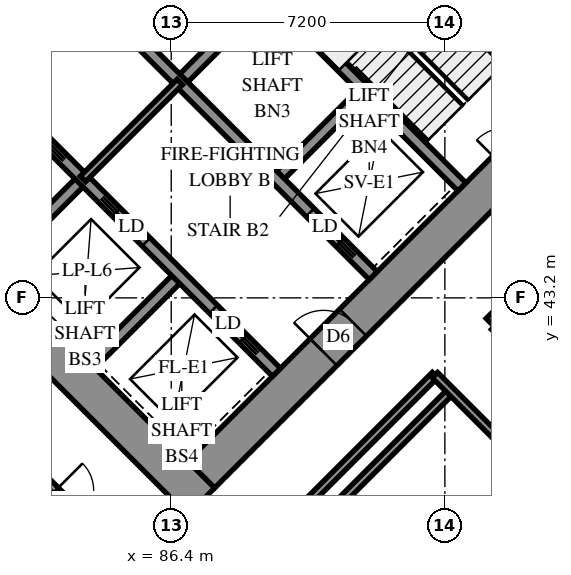
"""IFC4 building model, lengths in metres.
Left out: names, types, materials, properties, quantities, classifications, styles, units other than length and angle.
Written with IfcOpenShell. Run it as: python <this file> out.ifc"""

import sys

from ifc_helpers import new_model, si_unit, direction, frame, frame_2d, origin, place, context, subcontext, project, spatial, polyline, rectangle, outline, extrude, element, fill, save


model = new_model("IFC4")
c1 = context("Model", 3, precision=1e-05, world=origin(), true_north=direction((0.0, 1.0)))
c2 = subcontext(c1, "Body", "Model", "MODEL_VIEW")
j1 = project(units=[si_unit("LENGTHUNIT", "METRE"), si_unit("PLANEANGLEUNIT", "RADIAN")], contexts=[c1])
p1 = place(None, origin())
s1 = spatial("IfcSite", under=j1, at=p1, CompositionType="ELEMENT")
p2 = place(p1, origin())
s2 = spatial("IfcBuilding", under=s1, at=p2, CompositionType="ELEMENT")
p3 = place(p2, frame((0.0, 0.0, 22.8)))
s3 = spatial("IfcBuildingStorey", under=s2, at=p3, CompositionType="ELEMENT", Elevation=22.8)
p4 = place(p3, frame((75.594, 49.443, -0.4), z_axis=(0.0, 0.0, 1.0), x_axis=(0.7071037324, -0.70710983, 0.0)))
e1 = element("IfcWall", 1, at=p4, inside=s3, PredefinedType="SHEAR", context=c2, shape_type="SweptSolid", body=[
    extrude(rectangle(XDim=16.4, YDim=1.0, at=frame_2d((8.2, 0.0))), origin(), (0.0, 0.0, 1.0), 3.6),
])
p5 = place(p3, frame((86.483, 60.333, -0.4), z_axis=(0.0, 0.0, 1.0), x_axis=(0.70710983, -0.7071037324, 0.0)))
e2 = element("IfcWall", 2, at=p5, inside=s3, PredefinedType="SHEAR", context=c2, shape_type="SweptSolid", body=[
    extrude(rectangle(XDim=16.4, YDim=1.0, at=frame_2d((8.2, 0.0))), origin(), (0.0, 0.0, 1.0), 3.6),
])
p6 = place(p5, frame((11.0, 0.0, 0.4)))
e3 = element("IfcOpeningElement", 3, at=p6, cuts=e2, PredefinedType="OPENING", context=c2, shape_type="SweptSolid", body=[
    extrude(rectangle(XDim=0.8, YDim=2.1, at=frame_2d((0.4, 1.05))), frame((0.0, 0.51, 0.0), z_axis=(0.0, -1.0, 0.0), x_axis=(1.0, 0.0, 0.0)), (0.0, 0.0, 1.0), 1.02),
])
p7 = place(p3, frame((76.301, 49.443, -0.4), z_axis=(0.0, 0.0, 1.0), x_axis=(0.7071067812, 0.7071067812, 0.0)))
e4 = element("IfcWall", 4, at=p7, inside=s3, PredefinedType="SHEAR", context=c2, shape_type="SweptSolid", body=[
    extrude(rectangle(XDim=14.4, YDim=1.0, at=frame_2d((7.2, 0.0))), origin(), (0.0, 0.0, 1.0), 3.6),
])
p8 = place(p7, frame((4.55, 0.0, 0.4)))
e5 = element("IfcOpeningElement", 5, at=p8, cuts=e4, PredefinedType="OPENING", context=c2, shape_type="SweptSolid", body=[
    extrude(rectangle(XDim=1.1, YDim=2.1, at=frame_2d((0.55, 1.05))), frame((0.0, 0.51, 0.0), z_axis=(0.0, -1.0, 0.0), x_axis=(1.0, 0.0, 0.0)), (0.0, 0.0, 1.0), 1.02),
])
p9 = place(p7, frame((11.35, 0.0, 0.4)))
e6 = element("IfcOpeningElement", 6, at=p9, cuts=e4, PredefinedType="OPENING", context=c2, shape_type="SweptSolid", body=[
    extrude(rectangle(XDim=1.1, YDim=2.1, at=frame_2d((0.55, 1.05))), frame((0.0, 0.51, 0.0), z_axis=(0.0, -1.0, 0.0), x_axis=(1.0, 0.0, 0.0)), (0.0, 0.0, 1.0), 1.02),
])
p10 = place(p3, frame((87.19, 38.554, -0.4), z_axis=(0.0, 0.0, 1.0), x_axis=(0.707103309, 0.7071102534, 0.0)))
e7 = element("IfcWall", 7, at=p10, inside=s3, PredefinedType="SHEAR", context=c2, shape_type="SweptSolid", body=[
    extrude(rectangle(XDim=14.4, YDim=1.0, at=frame_2d((7.2, 0.0))), origin(), (0.0, 0.0, 1.0), 3.6),
])
p11 = place(p10, frame((4.55, 0.0, 0.4)))
e8 = element("IfcOpeningElement", 8, at=p11, cuts=e7, PredefinedType="OPENING", context=c2, shape_type="SweptSolid", body=[
    extrude(rectangle(XDim=1.1, YDim=2.1, at=frame_2d((0.55, 1.05))), frame((0.0, 0.51, 0.0), z_axis=(0.0, -1.0, 0.0), x_axis=(1.0, 0.0, 0.0)), (0.0, 0.0, 1.0), 1.02),
])
p12 = place(p10, frame((11.35, 0.0, 0.4)))
e9 = element("IfcOpeningElement", 9, at=p12, cuts=e7, PredefinedType="OPENING", context=c2, shape_type="SweptSolid", body=[
    extrude(rectangle(XDim=1.1, YDim=2.1, at=frame_2d((0.55, 1.05))), frame((0.0, 0.51, 0.0), z_axis=(0.0, -1.0, 0.0), x_axis=(1.0, 0.0, 0.0)), (0.0, 0.0, 1.0), 1.02),
])
p13 = place(p3, frame((81.746, 43.999, 0.0), z_axis=(0.0, 0.0, 1.0), x_axis=(0.7071067812, 0.7071067812, 0.0)))
e10 = element("IfcWall", 10, at=p13, inside=s3, PredefinedType="SOLIDWALL", context=c2, shape_type="SweptSolid", body=[
    extrude(rectangle(XDim=3.3, YDim=0.3, at=frame_2d((1.65, 0.0))), origin(), (0.0, 0.0, 1.0), 3.9),
])
p14 = place(p3, frame((86.625, 48.878, 0.0), z_axis=(0.0, 0.0, 1.0), x_axis=(0.7071067812, 0.7071067812, 0.0)))
e11 = element("IfcWall", 11, at=p14, inside=s3, PredefinedType="SOLIDWALL", context=c2, shape_type="SweptSolid", body=[
    extrude(rectangle(XDim=3.3, YDim=0.3, at=frame_2d((1.65, 0.0))), origin(), (0.0, 0.0, 1.0), 3.9),
])
p15 = place(p3, frame((84.291, 41.453, 0.0), z_axis=(0.0, 0.0, 1.0), x_axis=(0.7071067812, 0.7071067812, 0.0)))
e12 = element("IfcWall", 12, at=p15, inside=s3, PredefinedType="SOLIDWALL", context=c2, shape_type="SweptSolid", body=[
    extrude(rectangle(XDim=3.3, YDim=0.3, at=frame_2d((1.65, 0.0))), origin(), (0.0, 0.0, 1.0), 3.9),
])
p16 = place(p3, frame((89.17, 46.332, 0.0), z_axis=(0.0, 0.0, 1.0), x_axis=(0.7071067812, 0.7071067812, 0.0)))
e13 = element("IfcWall", 13, at=p16, inside=s3, PredefinedType="SOLIDWALL", context=c2, shape_type="SweptSolid", body=[
    extrude(rectangle(XDim=3.3, YDim=0.3, at=frame_2d((1.65, 0.0))), origin(), (0.0, 0.0, 1.0), 3.9),
])
p17 = place(p3, frame((78.988, 51.423, 0.0), z_axis=(0.0, 0.0, 1.0), x_axis=(0.7071067812, -0.7071067812, 0.0)))
e14 = element("IfcWall", 14, at=p17, inside=s3, PredefinedType="SOLIDWALL", context=c2, shape_type="SweptSolid", body=[
    extrude(rectangle(XDim=14.4, YDim=0.3, at=frame_2d((7.2, 0.0))), origin(), (0.0, 0.0, 1.0), 3.9),
])
p18 = place(p17, frame((1.25, 0.0, 0.0)))
e15 = element("IfcOpeningElement", 15, at=p18, cuts=e14, PredefinedType="OPENING", context=c2, shape_type="SweptSolid", body=[
    extrude(rectangle(XDim=1.1, YDim=2.1, at=frame_2d((0.55, 1.05))), frame((0.0, 0.16, 0.0), z_axis=(0.0, -1.0, 0.0), x_axis=(1.0, 0.0, 0.0)), (0.0, 0.0, 1.0), 0.32),
])
p19 = place(p17, frame((4.85, 0.0, 0.0)))
e16 = element("IfcOpeningElement", 16, at=p19, cuts=e14, PredefinedType="OPENING", context=c2, shape_type="SweptSolid", body=[
    extrude(rectangle(XDim=1.1, YDim=2.1, at=frame_2d((0.55, 1.05))), frame((0.0, 0.16, 0.0), z_axis=(0.0, -1.0, 0.0), x_axis=(1.0, 0.0, 0.0)), (0.0, 0.0, 1.0), 0.32),
])
p20 = place(p17, frame((8.45, 0.0, 0.0)))
e17 = element("IfcOpeningElement", 17, at=p20, cuts=e14, PredefinedType="OPENING", context=c2, shape_type="SweptSolid", body=[
    extrude(rectangle(XDim=1.1, YDim=2.1, at=frame_2d((0.55, 1.05))), frame((0.0, 0.16, 0.0), z_axis=(0.0, -1.0, 0.0), x_axis=(1.0, 0.0, 0.0)), (0.0, 0.0, 1.0), 0.32),
])
p21 = place(p17, frame((12.05, 0.0, 0.0)))
e18 = element("IfcOpeningElement", 18, at=p21, cuts=e14, PredefinedType="OPENING", context=c2, shape_type="SweptSolid", body=[
    extrude(rectangle(XDim=1.1, YDim=2.1, at=frame_2d((0.55, 1.05))), frame((0.0, 0.16, 0.0), z_axis=(0.0, -1.0, 0.0), x_axis=(1.0, 0.0, 0.0)), (0.0, 0.0, 1.0), 0.32),
])
p22 = place(p3, frame((81.534, 53.969, 0.0), z_axis=(0.0, 0.0, 1.0), x_axis=(0.707103309, -0.7071102534, 0.0)))
e19 = element("IfcWall", 19, at=p22, inside=s3, PredefinedType="SOLIDWALL", context=c2, shape_type="SweptSolid", body=[
    extrude(rectangle(XDim=14.4, YDim=0.3, at=frame_2d((7.2, 0.0))), origin(), (0.0, 0.0, 1.0), 3.9),
])
p23 = place(p22, frame((12.05, 0.0, 0.0)))
e20 = element("IfcOpeningElement", 20, at=p23, cuts=e19, PredefinedType="OPENING", context=c2, shape_type="SweptSolid", body=[
    extrude(rectangle(XDim=1.1, YDim=2.1, at=frame_2d((0.55, 1.05))), frame((0.0, 0.16, 0.0), z_axis=(0.0, -1.0, 0.0), x_axis=(1.0, 0.0, 0.0)), (0.0, 0.0, 1.0), 0.32),
])
p24 = place(p3, frame((88.958, 51.211, 0.0), z_axis=(0.0, 0.0, 1.0), x_axis=(0.7070998367, -0.7071137256, 0.0)))
e21 = element("IfcWall", 21, at=p24, inside=s3, PredefinedType="SOLIDWALL", context=c2, shape_type="SweptSolid", body=[
    extrude(rectangle(XDim=7.2, YDim=0.3, at=frame_2d((3.6, 0.0))), origin(), (0.0, 0.0, 1.0), 3.9),
])
p25 = place(p3, frame((117.843, 34.665, 0.0), z_axis=(0.0, 0.0, 1.0), x_axis=(-0.7071067812, 0.7071067812, 0.0)))
e22 = element("IfcWall", 22, at=p25, inside=s3, PredefinedType="SOLIDWALL", context=c2, shape_type="SweptSolid", body=[
    extrude(outline(polyline([(-0.275, -0.275), (54.222, -0.275), (53.994, 0.275), (0.275, 0.275), (-0.275, -0.275)])), origin(), (0.0, 0.0, 1.0), 3.9),
])
p26 = place(p25, frame((0.8, 0.0, 0.7)))
e23 = element("IfcOpeningElement", 23, at=p26, cuts=e22, PredefinedType="OPENING", context=c2, shape_type="SweptSolid", body=[
    extrude(rectangle(XDim=1.8, YDim=2.4, at=frame_2d((0.9, 1.2))), frame((0.0, 0.285, 0.0), z_axis=(0.0, -1.0, 0.0), x_axis=(1.0, 0.0, 0.0)), (0.0, 0.0, 1.0), 0.57),
])
p27 = place(p25, frame((4.225, 0.0, 0.7)))
e24 = element("IfcOpeningElement", 24, at=p27, cuts=e22, PredefinedType="OPENING", context=c2, shape_type="SweptSolid", body=[
    extrude(rectangle(XDim=1.8, YDim=2.4, at=frame_2d((0.9, 1.2))), frame((0.0, 0.285, 0.0), z_axis=(0.0, -1.0, 0.0), x_axis=(1.0, 0.0, 0.0)), (0.0, 0.0, 1.0), 0.57),
])
p28 = place(p25, frame((7.825, 0.0, 0.7)))
e25 = element("IfcOpeningElement", 25, at=p28, cuts=e22, PredefinedType="OPENING", context=c2, shape_type="SweptSolid", body=[
    extrude(rectangle(XDim=1.8, YDim=2.4, at=frame_2d((0.9, 1.2))), frame((0.0, 0.285, 0.0), z_axis=(0.0, -1.0, 0.0), x_axis=(1.0, 0.0, 0.0)), (0.0, 0.0, 1.0), 0.57),
])
p29 = place(p25, frame((11.425, 0.0, 0.7)))
e26 = element("IfcOpeningElement", 26, at=p29, cuts=e22, PredefinedType="OPENING", context=c2, shape_type="SweptSolid", body=[
    extrude(rectangle(XDim=1.8, YDim=2.4, at=frame_2d((0.9, 1.2))), frame((0.0, 0.285, 0.0), z_axis=(0.0, -1.0, 0.0), x_axis=(1.0, 0.0, 0.0)), (0.0, 0.0, 1.0), 0.57),
])
p30 = place(p25, frame((15.025, 0.0, 0.7)))
e27 = element("IfcOpeningElement", 27, at=p30, cuts=e22, PredefinedType="OPENING", context=c2, shape_type="SweptSolid", body=[
    extrude(rectangle(XDim=1.8, YDim=2.4, at=frame_2d((0.9, 1.2))), frame((0.0, 0.285, 0.0), z_axis=(0.0, -1.0, 0.0), x_axis=(1.0, 0.0, 0.0)), (0.0, 0.0, 1.0), 0.57),
])
p31 = place(p25, frame((18.625, 0.0, 0.7)))
e28 = element("IfcOpeningElement", 28, at=p31, cuts=e22, PredefinedType="OPENING", context=c2, shape_type="SweptSolid", body=[
    extrude(rectangle(XDim=1.8, YDim=2.4, at=frame_2d((0.9, 1.2))), frame((0.0, 0.285, 0.0), z_axis=(0.0, -1.0, 0.0), x_axis=(1.0, 0.0, 0.0)), (0.0, 0.0, 1.0), 0.57),
])
p32 = place(p25, frame((22.225, 0.0, 0.7)))
e29 = element("IfcOpeningElement", 29, at=p32, cuts=e22, PredefinedType="OPENING", context=c2, shape_type="SweptSolid", body=[
    extrude(rectangle(XDim=1.8, YDim=2.4, at=frame_2d((0.9, 1.2))), frame((0.0, 0.285, 0.0), z_axis=(0.0, -1.0, 0.0), x_axis=(1.0, 0.0, 0.0)), (0.0, 0.0, 1.0), 0.57),
])
p33 = place(p25, frame((25.825, 0.0, 0.7)))
e30 = element("IfcOpeningElement", 30, at=p33, cuts=e22, PredefinedType="OPENING", context=c2, shape_type="SweptSolid", body=[
    extrude(rectangle(XDim=1.8, YDim=2.4, at=frame_2d((0.9, 1.2))), frame((0.0, 0.285, 0.0), z_axis=(0.0, -1.0, 0.0), x_axis=(1.0, 0.0, 0.0)), (0.0, 0.0, 1.0), 0.57),
])
p34 = place(p25, frame((29.425, 0.0, 0.7)))
e31 = element("IfcOpeningElement", 31, at=p34, cuts=e22, PredefinedType="OPENING", context=c2, shape_type="SweptSolid", body=[
    extrude(rectangle(XDim=1.8, YDim=2.4, at=frame_2d((0.9, 1.2))), frame((0.0, 0.285, 0.0), z_axis=(0.0, -1.0, 0.0), x_axis=(1.0, 0.0, 0.0)), (0.0, 0.0, 1.0), 0.57),
])
p35 = place(p25, frame((33.025, 0.0, 0.7)))
e32 = element("IfcOpeningElement", 32, at=p35, cuts=e22, PredefinedType="OPENING", context=c2, shape_type="SweptSolid", body=[
    extrude(rectangle(XDim=1.8, YDim=2.4, at=frame_2d((0.9, 1.2))), frame((0.0, 0.285, 0.0), z_axis=(0.0, -1.0, 0.0), x_axis=(1.0, 0.0, 0.0)), (0.0, 0.0, 1.0), 0.57),
])
p36 = place(p25, frame((36.625, 0.0, 0.7)))
e33 = element("IfcOpeningElement", 33, at=p36, cuts=e22, PredefinedType="OPENING", context=c2, shape_type="SweptSolid", body=[
    extrude(rectangle(XDim=1.8, YDim=2.4, at=frame_2d((0.9, 1.2))), frame((0.0, 0.285, 0.0), z_axis=(0.0, -1.0, 0.0), x_axis=(1.0, 0.0, 0.0)), (0.0, 0.0, 1.0), 0.57),
])
p37 = place(p25, frame((40.225, 0.0, 0.7)))
e34 = element("IfcOpeningElement", 34, at=p37, cuts=e22, PredefinedType="OPENING", context=c2, shape_type="SweptSolid", body=[
    extrude(rectangle(XDim=1.8, YDim=2.4, at=frame_2d((0.9, 1.2))), frame((0.0, 0.285, 0.0), z_axis=(0.0, -1.0, 0.0), x_axis=(1.0, 0.0, 0.0)), (0.0, 0.0, 1.0), 0.57),
])
p38 = place(p25, frame((43.825, 0.0, 0.7)))
e35 = element("IfcOpeningElement", 35, at=p38, cuts=e22, PredefinedType="OPENING", context=c2, shape_type="SweptSolid", body=[
    extrude(rectangle(XDim=1.8, YDim=2.4, at=frame_2d((0.9, 1.2))), frame((0.0, 0.285, 0.0), z_axis=(0.0, -1.0, 0.0), x_axis=(1.0, 0.0, 0.0)), (0.0, 0.0, 1.0), 0.57),
])
p39 = place(p25, frame((47.425, 0.0, 0.7)))
e36 = element("IfcOpeningElement", 36, at=p39, cuts=e22, PredefinedType="OPENING", context=c2, shape_type="SweptSolid", body=[
    extrude(rectangle(XDim=1.8, YDim=2.4, at=frame_2d((0.9, 1.2))), frame((0.0, 0.285, 0.0), z_axis=(0.0, -1.0, 0.0), x_axis=(1.0, 0.0, 0.0)), (0.0, 0.0, 1.0), 0.57),
])
p40 = place(p25, frame((51.06, 0.0, 0.7)))
e37 = element("IfcOpeningElement", 37, at=p40, cuts=e22, PredefinedType="OPENING", context=c2, shape_type="SweptSolid", body=[
    extrude(rectangle(XDim=1.8, YDim=2.4, at=frame_2d((0.9, 1.2))), frame((0.0, 0.285, 0.0), z_axis=(0.0, -1.0, 0.0), x_axis=(1.0, 0.0, 0.0)), (0.0, 0.0, 1.0), 0.57),
])
p41 = place(p3, frame((77.07, 42.275, 0.0), z_axis=(0.0, 0.0, 1.0), x_axis=(0.7071067812, -0.7071067812, 0.0)))
e38 = element("IfcWall", 38, at=p41, inside=s3, PredefinedType="SOLIDWALL", context=c2, shape_type="SweptSolid", body=[
    extrude(outline(polyline([(0.114, -0.275), (39.288, -0.275), (38.737, 0.275), (-0.114, 0.275), (0.114, -0.275)])), origin(), (0.0, 0.0, 1.0), 3.9),
])
p42 = place(p41, frame((2.837, 0.0, 0.7)))
e39 = element("IfcOpeningElement", 39, at=p42, cuts=e38, PredefinedType="OPENING", context=c2, shape_type="SweptSolid", body=[
    extrude(rectangle(XDim=1.8, YDim=2.4, at=frame_2d((0.9, 1.2))), frame((0.0, 0.285, 0.0), z_axis=(0.0, -1.0, 0.0), x_axis=(1.0, 0.0, 0.0)), (0.0, 0.0, 1.0), 0.57),
])
p43 = place(p41, frame((6.588, 0.0, 0.7)))
e40 = element("IfcOpeningElement", 40, at=p43, cuts=e38, PredefinedType="OPENING", context=c2, shape_type="SweptSolid", body=[
    extrude(rectangle(XDim=1.8, YDim=2.4, at=frame_2d((0.9, 1.2))), frame((0.0, 0.285, 0.0), z_axis=(0.0, -1.0, 0.0), x_axis=(1.0, 0.0, 0.0)), (0.0, 0.0, 1.0), 0.57),
])
p44 = place(p41, frame((10.188, 0.0, 0.7)))
e41 = element("IfcOpeningElement", 41, at=p44, cuts=e38, PredefinedType="OPENING", context=c2, shape_type="SweptSolid", body=[
    extrude(rectangle(XDim=1.8, YDim=2.4, at=frame_2d((0.9, 1.2))), frame((0.0, 0.285, 0.0), z_axis=(0.0, -1.0, 0.0), x_axis=(1.0, 0.0, 0.0)), (0.0, 0.0, 1.0), 0.57),
])
p45 = place(p41, frame((13.787, 0.0, 0.7)))
e42 = element("IfcOpeningElement", 42, at=p45, cuts=e38, PredefinedType="OPENING", context=c2, shape_type="SweptSolid", body=[
    extrude(rectangle(XDim=1.8, YDim=2.4, at=frame_2d((0.9, 1.2))), frame((0.0, 0.285, 0.0), z_axis=(0.0, -1.0, 0.0), x_axis=(1.0, 0.0, 0.0)), (0.0, 0.0, 1.0), 0.57),
])
p46 = place(p41, frame((17.387, 0.0, 0.7)))
e43 = element("IfcOpeningElement", 43, at=p46, cuts=e38, PredefinedType="OPENING", context=c2, shape_type="SweptSolid", body=[
    extrude(rectangle(XDim=1.8, YDim=2.4, at=frame_2d((0.9, 1.2))), frame((0.0, 0.285, 0.0), z_axis=(0.0, -1.0, 0.0), x_axis=(1.0, 0.0, 0.0)), (0.0, 0.0, 1.0), 0.57),
])
p47 = place(p41, frame((20.988, 0.0, 0.7)))
e44 = element("IfcOpeningElement", 44, at=p47, cuts=e38, PredefinedType="OPENING", context=c2, shape_type="SweptSolid", body=[
    extrude(rectangle(XDim=1.8, YDim=2.4, at=frame_2d((0.9, 1.2))), frame((0.0, 0.285, 0.0), z_axis=(0.0, -1.0, 0.0), x_axis=(1.0, 0.0, 0.0)), (0.0, 0.0, 1.0), 0.57),
])
p48 = place(p41, frame((24.587, 0.0, 0.7)))
e45 = element("IfcOpeningElement", 45, at=p48, cuts=e38, PredefinedType="OPENING", context=c2, shape_type="SweptSolid", body=[
    extrude(rectangle(XDim=1.8, YDim=2.4, at=frame_2d((0.9, 1.2))), frame((0.0, 0.285, 0.0), z_axis=(0.0, -1.0, 0.0), x_axis=(1.0, 0.0, 0.0)), (0.0, 0.0, 1.0), 0.57),
])
p49 = place(p41, frame((28.188, 0.0, 0.7)))
e46 = element("IfcOpeningElement", 46, at=p49, cuts=e38, PredefinedType="OPENING", context=c2, shape_type="SweptSolid", body=[
    extrude(rectangle(XDim=1.8, YDim=2.4, at=frame_2d((0.9, 1.2))), frame((0.0, 0.285, 0.0), z_axis=(0.0, -1.0, 0.0), x_axis=(1.0, 0.0, 0.0)), (0.0, 0.0, 1.0), 0.57),
])
p50 = place(p41, frame((31.788, 0.0, 0.7)))
e47 = element("IfcOpeningElement", 47, at=p50, cuts=e38, PredefinedType="OPENING", context=c2, shape_type="SweptSolid", body=[
    extrude(rectangle(XDim=1.8, YDim=2.4, at=frame_2d((0.9, 1.2))), frame((0.0, 0.285, 0.0), z_axis=(0.0, -1.0, 0.0), x_axis=(1.0, 0.0, 0.0)), (0.0, 0.0, 1.0), 0.57),
])
p51 = place(p41, frame((35.388, 0.0, 0.7)))
e48 = element("IfcOpeningElement", 48, at=p51, cuts=e38, PredefinedType="OPENING", context=c2, shape_type="SweptSolid", body=[
    extrude(rectangle(XDim=1.8, YDim=2.4, at=frame_2d((0.9, 1.2))), frame((0.0, 0.285, 0.0), z_axis=(0.0, -1.0, 0.0), x_axis=(1.0, 0.0, 0.0)), (0.0, 0.0, 1.0), 0.57),
])
p52 = place(p3, frame((91.313, 53.354, 0.0), z_axis=(0.0, 0.0, 1.0), x_axis=(0.7071067812, -0.7071067812, 0.0)))
e49 = element("IfcWall", 49, at=p52, inside=s3, PredefinedType="PARTITIONING", context=c2, shape_type="SweptSolid", body=[
    extrude(rectangle(XDim=5.95, YDim=0.15, at=frame_2d((2.975, 0.0))), origin(), (0.0, 0.0, 1.0), 3.9),
])
p53 = place(p3, frame((84.079, 46.332, 0.0), z_axis=(0.0, 0.0, 1.0), x_axis=(0.7071067812, 0.7071067812, 0.0)))
e50 = element("IfcWall", 50, at=p53, inside=s3, PredefinedType="PARTITIONING", context=c2, shape_type="SweptSolid", body=[
    extrude(rectangle(XDim=3.6, YDim=0.2, at=frame_2d((1.8, 0.0))), origin(), (0.0, 0.0, 1.0), 3.9),
])
p54 = place(p3, frame((86.375, 33.358, 0.0), z_axis=(0.0, 0.0, 1.0), x_axis=(0.707006294, 0.7072072541, 0.0)))
e51 = element("IfcWall", 51, at=p54, inside=s3, PredefinedType="PARTITIONING", context=c2, shape_type="SweptSolid", body=[
    extrude(rectangle(XDim=10.45, YDim=0.2, at=frame_2d((5.225, 0.0))), origin(), (0.0, 0.0, 1.0), 3.9),
])
for number, where, z_axis, x_axis in (
    (52, (86.837, 34.667, 0.0), (0.0, 0.0, 1.0), (0.707, 0.707, 0.0)),
    (53, (94.757, 42.587, 0.0), (0.0, 0.0, 1.0), (0.707, 0.707, 0.0)),
):
    element("IfcWall", number, at=place(p3, frame(where, z_axis=z_axis, x_axis=x_axis)), inside=s3, PredefinedType="PARTITIONING", context=c2, shape_type="SweptSolid", body=[
        extrude(rectangle(XDim=9.198, YDim=0.2, at=frame_2d((4.599, 0.0))), origin(), (0.0, 0.0, 1.0), 3.9),
    ])
p55 = place(p3, frame((93.339, 41.167, 0.0), z_axis=(0.0, 0.0, 1.0), x_axis=(0.7071067812, -0.7071067812, 0.0)))
e54 = element("IfcWall", 54, at=p55, inside=s3, PredefinedType="PARTITIONING", context=c2, shape_type="SweptSolid", body=[
    extrude(rectangle(XDim=7.801, YDim=0.2, at=frame_2d((3.9, 0.0))), origin(), (0.0, 0.0, 1.0), 3.9),
])
p56 = place(p55, frame((2.938, 0.0, 0.0)))
e55 = element("IfcOpeningElement", 55, at=p56, cuts=e54, PredefinedType="OPENING", context=c2, shape_type="SweptSolid", body=[
    extrude(rectangle(XDim=1.0, YDim=2.1, at=frame_2d((0.5, 1.05))), frame((0.0, 0.11, 0.0), z_axis=(0.0, -1.0, 0.0), x_axis=(1.0, 0.0, 0.0)), (0.0, 0.0, 1.0), 0.22),
])
p57 = place(p3, frame((94.895, 42.439, 0.0), z_axis=(0.0, 0.0, 1.0), x_axis=(0.7071067812, -0.7071067812, 0.0)))
e56 = element("IfcWall", 56, at=p57, inside=s3, PredefinedType="PARTITIONING", context=c2, shape_type="SweptSolid", body=[
    extrude(rectangle(XDim=7.6, YDim=0.2, at=frame_2d((3.8, 0.0))), origin(), (0.0, 0.0, 1.0), 3.9),
])
p58 = place(p57, frame((2.773, 0.0, 0.0)))
e57 = element("IfcOpeningElement", 57, at=p58, cuts=e56, PredefinedType="OPENING", context=c2, shape_type="SweptSolid", body=[
    extrude(rectangle(XDim=1.0, YDim=2.1, at=frame_2d((0.5, 1.05))), frame((0.0, 0.11, 0.0), z_axis=(0.0, -1.0, 0.0), x_axis=(1.0, 0.0, 0.0)), (0.0, 0.0, 1.0), 0.22),
])
p59 = place(p3, frame((80.148, 41.346, 0.0), z_axis=(0.0, 0.0, 1.0), x_axis=(0.7071067812, -0.7071067812, 0.0)))
e58 = element("IfcWall", 58, at=p59, inside=s3, PredefinedType="PARTITIONING", context=c2, shape_type="SweptSolid", body=[
    extrude(rectangle(XDim=6.206, YDim=0.2, at=frame_2d((3.103, 0.0))), origin(), (0.0, 0.0, 1.0), 3.9),
])
p60 = place(p59, frame((4.541, 0.0, 0.0)))
e59 = element("IfcOpeningElement", 59, at=p60, cuts=e58, PredefinedType="OPENING", context=c2, shape_type="SweptSolid", body=[
    extrude(rectangle(XDim=1.0, YDim=2.1, at=frame_2d((0.5, 1.05))), frame((0.0, 0.11, 0.0), z_axis=(0.0, -1.0, 0.0), x_axis=(1.0, 0.0, 0.0)), (0.0, 0.0, 1.0), 0.22),
])
p61 = place(p11, origin())
e60 = element("IfcDoor", 60, at=p61, inside=s3, OperationType="DOUBLE_DOOR_SINGLE_SWING", PredefinedType="DOOR", context=c2, shape_type="SweptSolid", body=[
    extrude(rectangle(XDim=1.1, YDim=2.1, at=frame_2d((0.55, 1.05))), frame((0.0, 0.025, 0.0), z_axis=(0.0, -1.0, 0.0), x_axis=(1.0, 0.0, 0.0)), (0.0, 0.0, 1.0), 0.05),
])
fill(e8, e60)
p62 = place(p20, origin())
e61 = element("IfcDoor", 61, at=p62, inside=s3, OperationType="SLIDING_TO_LEFT", PredefinedType="DOOR", context=c2, shape_type="SweptSolid", body=[
    extrude(rectangle(XDim=1.1, YDim=2.1, at=frame_2d((0.55, 1.05))), frame((0.0, 0.025, 0.0), z_axis=(0.0, -1.0, 0.0), x_axis=(1.0, 0.0, 0.0)), (0.0, 0.0, 1.0), 0.05),
])
fill(e17, e61)
p63 = place(p21, origin())
e62 = element("IfcDoor", 62, at=p63, inside=s3, OperationType="SLIDING_TO_RIGHT", PredefinedType="DOOR", context=c2, shape_type="SweptSolid", body=[
    extrude(rectangle(XDim=1.1, YDim=2.1, at=frame_2d((0.55, 1.05))), frame((0.0, 0.025, 0.0), z_axis=(0.0, -1.0, 0.0), x_axis=(1.0, 0.0, 0.0)), (0.0, 0.0, 1.0), 0.05),
])
fill(e18, e62)
p64 = place(p23, origin())
e63 = element("IfcDoor", 63, at=p64, inside=s3, OperationType="SLIDING_TO_RIGHT", PredefinedType="DOOR", context=c2, shape_type="SweptSolid", body=[
    extrude(rectangle(XDim=1.1, YDim=2.1, at=frame_2d((0.55, 1.05))), frame((0.0, 0.025, 0.0), z_axis=(0.0, -1.0, 0.0), x_axis=(1.0, 0.0, 0.0)), (0.0, 0.0, 1.0), 0.05),
])
fill(e20, e63)
p65 = place(p60, origin())
e64 = element("IfcDoor", 64, at=p65, inside=s3, OperationType="SINGLE_SWING_RIGHT", PredefinedType="DOOR", context=c2, shape_type="SweptSolid", body=[
    extrude(rectangle(XDim=1.0, YDim=2.1, at=frame_2d((0.5, 1.05))), frame((0.0, 0.025, 0.0), z_axis=(0.0, -1.0, 0.0), x_axis=(1.0, 0.0, 0.0)), (0.0, 0.0, 1.0), 0.05),
])
fill(e59, e64)
save(model, sys.argv[1])
